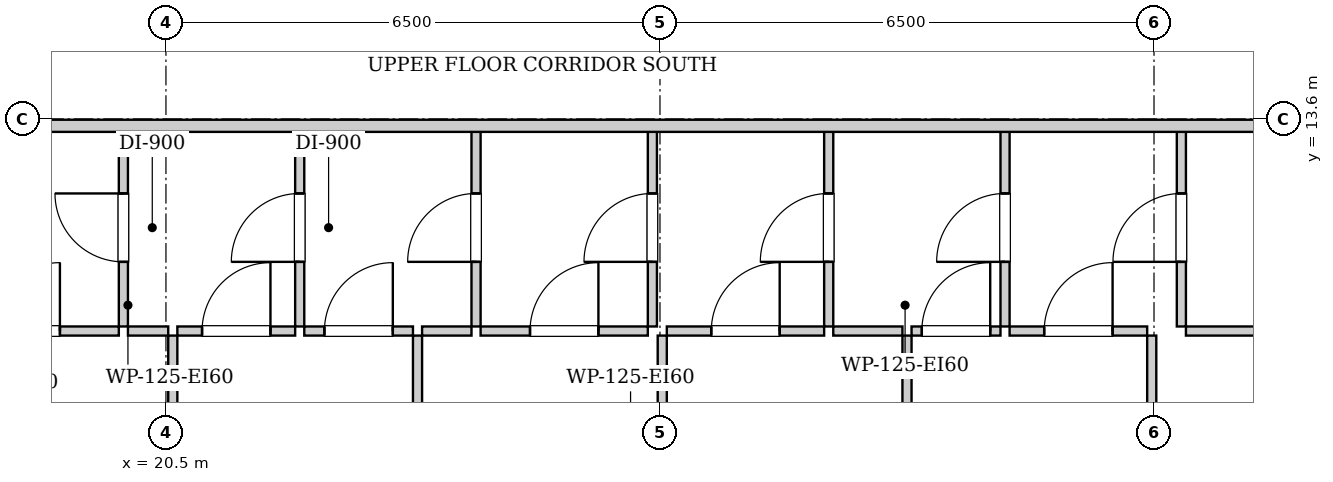
"""IFC4 building model, lengths in metres.
Left out: names, types, materials, properties, quantities, classifications, styles, units other than length and angle.
Written with IfcOpenShell. Run it as: python <this file> out.ifc"""

import sys

from ifc_helpers import new_model, si_unit, direction, frame, frame_2d, origin, place, context, subcontext, project, spatial, rectangle, extrude, element, fill, save


model = new_model("IFC4")
c1 = context("Model", 3, precision=1e-05, world=origin(), true_north=direction((0.0, 1.0)))
c2 = subcontext(c1, "Body", "Model", "MODEL_VIEW")
j1 = project(units=[si_unit("LENGTHUNIT", "METRE"), si_unit("PLANEANGLEUNIT", "RADIAN")], contexts=[c1])
p1 = place(None, origin())
s1 = spatial("IfcSite", under=j1, at=p1, CompositionType="ELEMENT")
p2 = place(p1, origin())
s2 = spatial("IfcBuilding", under=s1, at=p2, CompositionType="ELEMENT")
p3 = place(p2, frame((0.0, 0.0, 227.5)))
s3 = spatial("IfcBuildingStorey", under=s2, at=p3, CompositionType="ELEMENT", Elevation=227.5)
p4 = place(p3, frame((19.94, 10.87, 0.0), z_axis=(0.0, 0.0, 1.0), x_axis=(0.0, 1.0, 0.0)))
e1 = element("IfcWall", 1, at=p4, inside=s3, PredefinedType="PARTITIONING", context=c2, shape_type="SweptSolid", body=[
    extrude(rectangle(XDim=2.6, YDim=0.12, at=frame_2d((1.3, 0.0))), origin(), (0.0, 0.0, 1.0), 3.14),
])
p5 = place(p4, frame((0.85, 0.0, 0.0)))
e2 = element("IfcOpeningElement", 2, at=p5, cuts=e1, PredefinedType="OPENING", context=c2, shape_type="SweptSolid", body=[
    extrude(rectangle(XDim=0.9, YDim=2.05, at=frame_2d((0.45, 1.025))), frame((0.0, 0.07, 0.0), z_axis=(0.0, -1.0, 0.0), x_axis=(1.0, 0.0, 0.0)), (0.0, 0.0, 1.0), 0.14),
])
p6 = place(p3, frame((17.43, 10.81, 0.0), z_axis=(0.0, 0.0, 1.0), x_axis=(1.0, 0.0, 0.0)))
e3 = element("IfcWall", 3, at=p6, inside=s3, PredefinedType="PARTITIONING", context=c2, shape_type="SweptSolid", body=[
    extrude(rectangle(XDim=2.45, YDim=0.12, at=frame_2d((1.225, 0.0))), origin(), (0.0, 0.0, 1.0), 3.14),
])
p7 = place(p6, frame((0.775, 0.0, 0.0)))
e4 = element("IfcOpeningElement", 4, at=p7, cuts=e3, PredefinedType="OPENING", context=c2, shape_type="SweptSolid", body=[
    extrude(rectangle(XDim=0.9, YDim=2.05, at=frame_2d((0.45, 1.025))), frame((0.0, 0.07, 0.0), z_axis=(0.0, -1.0, 0.0), x_axis=(1.0, 0.0, 0.0)), (0.0, 0.0, 1.0), 0.14),
])
p8 = place(p3, frame((22.26, 10.87, 0.0), z_axis=(0.0, 0.0, 1.0), x_axis=(0.0, 1.0, 0.0)))
e5 = element("IfcWall", 5, at=p8, inside=s3, PredefinedType="PARTITIONING", context=c2, shape_type="SweptSolid", body=[
    extrude(rectangle(XDim=2.6, YDim=0.12, at=frame_2d((1.3, 0.0))), origin(), (0.0, 0.0, 1.0), 3.14),
])
p9 = place(p8, frame((0.85, 0.0, 0.0)))
e6 = element("IfcOpeningElement", 6, at=p9, cuts=e5, PredefinedType="OPENING", context=c2, shape_type="SweptSolid", body=[
    extrude(rectangle(XDim=0.9, YDim=2.05, at=frame_2d((0.45, 1.025))), frame((0.0, 0.07, 0.0), z_axis=(0.0, -1.0, 0.0), x_axis=(1.0, 0.0, 0.0)), (0.0, 0.0, 1.0), 0.14),
])
p10 = place(p3, frame((20.0, 10.81, 0.0), z_axis=(0.0, 0.0, 1.0), x_axis=(1.0, 0.0, 0.0)))
e7 = element("IfcWall", 7, at=p10, inside=s3, PredefinedType="PARTITIONING", context=c2, shape_type="SweptSolid", body=[
    extrude(rectangle(XDim=0.53, YDim=0.12, at=frame_2d((0.265, 0.0))), origin(), (0.0, 0.0, 1.0), 3.14),
])
p11 = place(p3, frame((20.65, 10.81, 0.0), z_axis=(0.0, 0.0, 1.0), x_axis=(1.0, 0.0, 0.0)))
e8 = element("IfcWall", 8, at=p11, inside=s3, PredefinedType="PARTITIONING", context=c2, shape_type="SweptSolid", body=[
    extrude(rectangle(XDim=1.55, YDim=0.12, at=frame_2d((0.775, 0.0))), origin(), (0.0, 0.0, 1.0), 3.14),
])
p12 = place(p11, frame((0.325, 0.0, 0.0)))
e9 = element("IfcOpeningElement", 9, at=p12, cuts=e8, PredefinedType="OPENING", context=c2, shape_type="SweptSolid", body=[
    extrude(rectangle(XDim=0.9, YDim=2.05, at=frame_2d((0.45, 1.025))), frame((0.0, 0.07, 0.0), z_axis=(0.0, -1.0, 0.0), x_axis=(1.0, 0.0, 0.0)), (0.0, 0.0, 1.0), 0.14),
])
p13 = place(p3, frame((24.58, 10.87, 0.0), z_axis=(0.0, 0.0, 1.0), x_axis=(0.0, 1.0, 0.0)))
e10 = element("IfcWall", 10, at=p13, inside=s3, PredefinedType="PARTITIONING", context=c2, shape_type="SweptSolid", body=[
    extrude(rectangle(XDim=2.6, YDim=0.12, at=frame_2d((1.3, 0.0))), origin(), (0.0, 0.0, 1.0), 3.14),
])
p14 = place(p13, frame((0.85, 0.0, 0.0)))
e11 = element("IfcOpeningElement", 11, at=p14, cuts=e10, PredefinedType="OPENING", context=c2, shape_type="SweptSolid", body=[
    extrude(rectangle(XDim=0.9, YDim=2.05, at=frame_2d((0.45, 1.025))), frame((0.0, 0.07, 0.0), z_axis=(0.0, -1.0, 0.0), x_axis=(1.0, 0.0, 0.0)), (0.0, 0.0, 1.0), 0.14),
])
p15 = place(p3, frame((22.32, 10.81, 0.0), z_axis=(0.0, 0.0, 1.0), x_axis=(1.0, 0.0, 0.0)))
e12 = element("IfcWall", 12, at=p15, inside=s3, PredefinedType="PARTITIONING", context=c2, shape_type="SweptSolid", body=[
    extrude(rectangle(XDim=1.43, YDim=0.12, at=frame_2d((0.715, 0.0))), origin(), (0.0, 0.0, 1.0), 3.14),
])
p16 = place(p15, frame((0.265, 0.0, 0.0)))
e13 = element("IfcOpeningElement", 13, at=p16, cuts=e12, PredefinedType="OPENING", context=c2, shape_type="SweptSolid", body=[
    extrude(rectangle(XDim=0.9, YDim=2.05, at=frame_2d((0.45, 1.025))), frame((0.0, 0.07, 0.0), z_axis=(0.0, -1.0, 0.0), x_axis=(1.0, 0.0, 0.0)), (0.0, 0.0, 1.0), 0.14),
])
p17 = place(p3, frame((23.87, 10.81, 0.0), z_axis=(0.0, 0.0, 1.0), x_axis=(1.0, 0.0, 0.0)))
e14 = element("IfcWall", 14, at=p17, inside=s3, PredefinedType="PARTITIONING", context=c2, shape_type="SweptSolid", body=[
    extrude(rectangle(XDim=0.65, YDim=0.12, at=frame_2d((0.325, 0.0))), origin(), (0.0, 0.0, 1.0), 3.14),
])
p18 = place(p3, frame((26.9, 10.87, 0.0), z_axis=(0.0, 0.0, 1.0), x_axis=(0.0, 1.0, 0.0)))
e15 = element("IfcWall", 15, at=p18, inside=s3, PredefinedType="PARTITIONING", context=c2, shape_type="SweptSolid", body=[
    extrude(rectangle(XDim=2.6, YDim=0.12, at=frame_2d((1.3, 0.0))), origin(), (0.0, 0.0, 1.0), 3.14),
])
p19 = place(p18, frame((0.85, 0.0, 0.0)))
e16 = element("IfcOpeningElement", 16, at=p19, cuts=e15, PredefinedType="OPENING", context=c2, shape_type="SweptSolid", body=[
    extrude(rectangle(XDim=0.9, YDim=2.05, at=frame_2d((0.45, 1.025))), frame((0.0, 0.07, 0.0), z_axis=(0.0, -1.0, 0.0), x_axis=(1.0, 0.0, 0.0)), (0.0, 0.0, 1.0), 0.14),
])
p20 = place(p3, frame((24.64, 10.81, 0.0), z_axis=(0.0, 0.0, 1.0), x_axis=(1.0, 0.0, 0.0)))
e17 = element("IfcWall", 17, at=p20, inside=s3, PredefinedType="PARTITIONING", context=c2, shape_type="SweptSolid", body=[
    extrude(rectangle(XDim=2.2, YDim=0.12, at=frame_2d((1.1, 0.0))), origin(), (0.0, 0.0, 1.0), 3.14),
])
p21 = place(p20, frame((0.65, 0.0, 0.0)))
e18 = element("IfcOpeningElement", 18, at=p21, cuts=e17, PredefinedType="OPENING", context=c2, shape_type="SweptSolid", body=[
    extrude(rectangle(XDim=0.9, YDim=2.05, at=frame_2d((0.45, 1.025))), frame((0.0, 0.07, 0.0), z_axis=(0.0, -1.0, 0.0), x_axis=(1.0, 0.0, 0.0)), (0.0, 0.0, 1.0), 0.14),
])
p22 = place(p3, frame((29.22, 10.87, 0.0), z_axis=(0.0, 0.0, 1.0), x_axis=(0.0, 1.0, 0.0)))
e19 = element("IfcWall", 19, at=p22, inside=s3, PredefinedType="PARTITIONING", context=c2, shape_type="SweptSolid", body=[
    extrude(rectangle(XDim=2.6, YDim=0.12, at=frame_2d((1.3, 0.0))), origin(), (0.0, 0.0, 1.0), 3.14),
])
p23 = place(p22, frame((0.85, 0.0, 0.0)))
e20 = element("IfcOpeningElement", 20, at=p23, cuts=e19, PredefinedType="OPENING", context=c2, shape_type="SweptSolid", body=[
    extrude(rectangle(XDim=0.9, YDim=2.05, at=frame_2d((0.45, 1.025))), frame((0.0, 0.07, 0.0), z_axis=(0.0, -1.0, 0.0), x_axis=(1.0, 0.0, 0.0)), (0.0, 0.0, 1.0), 0.14),
])
p24 = place(p3, frame((27.09, 10.81, 0.0), z_axis=(0.0, 0.0, 1.0), x_axis=(1.0, 0.0, 0.0)))
e21 = element("IfcWall", 21, at=p24, inside=s3, PredefinedType="PARTITIONING", context=c2, shape_type="SweptSolid", body=[
    extrude(rectangle(XDim=2.07, YDim=0.12, at=frame_2d((1.035, 0.0))), origin(), (0.0, 0.0, 1.0), 3.14),
])
p25 = place(p24, frame((0.585, 0.0, 0.0)))
e22 = element("IfcOpeningElement", 22, at=p25, cuts=e21, PredefinedType="OPENING", context=c2, shape_type="SweptSolid", body=[
    extrude(rectangle(XDim=0.9, YDim=2.05, at=frame_2d((0.45, 1.025))), frame((0.0, 0.07, 0.0), z_axis=(0.0, -1.0, 0.0), x_axis=(1.0, 0.0, 0.0)), (0.0, 0.0, 1.0), 0.14),
])
p26 = place(p3, frame((31.54, 10.87, 0.0), z_axis=(0.0, 0.0, 1.0), x_axis=(0.0, 1.0, 0.0)))
e23 = element("IfcWall", 23, at=p26, inside=s3, PredefinedType="PARTITIONING", context=c2, shape_type="SweptSolid", body=[
    extrude(rectangle(XDim=2.6, YDim=0.12, at=frame_2d((1.3, 0.0))), origin(), (0.0, 0.0, 1.0), 3.14),
])
p27 = place(p26, frame((0.85, 0.0, 0.0)))
e24 = element("IfcOpeningElement", 24, at=p27, cuts=e23, PredefinedType="OPENING", context=c2, shape_type="SweptSolid", body=[
    extrude(rectangle(XDim=0.9, YDim=2.05, at=frame_2d((0.45, 1.025))), frame((0.0, 0.07, 0.0), z_axis=(0.0, -1.0, 0.0), x_axis=(1.0, 0.0, 0.0)), (0.0, 0.0, 1.0), 0.14),
])
p28 = place(p3, frame((29.28, 10.81, 0.0), z_axis=(0.0, 0.0, 1.0), x_axis=(1.0, 0.0, 0.0)))
e25 = element("IfcWall", 25, at=p28, inside=s3, PredefinedType="PARTITIONING", context=c2, shape_type="SweptSolid", body=[
    extrude(rectangle(XDim=0.91, YDim=0.12, at=frame_2d((0.455, 0.0))), origin(), (0.0, 0.0, 1.0), 3.14),
])
p29 = place(p3, frame((30.31, 10.81, 0.0), z_axis=(0.0, 0.0, 1.0), x_axis=(1.0, 0.0, 0.0)))
e26 = element("IfcWall", 26, at=p29, inside=s3, PredefinedType="PARTITIONING", context=c2, shape_type="SweptSolid", body=[
    extrude(rectangle(XDim=1.17, YDim=0.12, at=frame_2d((0.585, 0.0))), origin(), (0.0, 0.0, 1.0), 3.14),
])
p30 = place(p29, frame((0.135, 0.0, 0.0)))
e27 = element("IfcOpeningElement", 27, at=p30, cuts=e26, PredefinedType="OPENING", context=c2, shape_type="SweptSolid", body=[
    extrude(rectangle(XDim=0.9, YDim=2.05, at=frame_2d((0.45, 1.025))), frame((0.0, 0.07, 0.0), z_axis=(0.0, -1.0, 0.0), x_axis=(1.0, 0.0, 0.0)), (0.0, 0.0, 1.0), 0.14),
])
p31 = place(p3, frame((33.86, 10.87, 0.0), z_axis=(0.0, 0.0, 1.0), x_axis=(0.0, 1.0, 0.0)))
e28 = element("IfcWall", 28, at=p31, inside=s3, PredefinedType="PARTITIONING", context=c2, shape_type="SweptSolid", body=[
    extrude(rectangle(XDim=2.6, YDim=0.12, at=frame_2d((1.3, 0.0))), origin(), (0.0, 0.0, 1.0), 3.14),
])
p32 = place(p31, frame((0.85, 0.0, 0.0)))
e29 = element("IfcOpeningElement", 29, at=p32, cuts=e28, PredefinedType="OPENING", context=c2, shape_type="SweptSolid", body=[
    extrude(rectangle(XDim=0.9, YDim=2.05, at=frame_2d((0.45, 1.025))), frame((0.0, 0.07, 0.0), z_axis=(0.0, -1.0, 0.0), x_axis=(1.0, 0.0, 0.0)), (0.0, 0.0, 1.0), 0.14),
])
p33 = place(p3, frame((31.6, 10.81, 0.0), z_axis=(0.0, 0.0, 1.0), x_axis=(1.0, 0.0, 0.0)))
e30 = element("IfcWall", 30, at=p33, inside=s3, PredefinedType="PARTITIONING", context=c2, shape_type="SweptSolid", body=[
    extrude(rectangle(XDim=1.81, YDim=0.12, at=frame_2d((0.905, 0.0))), origin(), (0.0, 0.0, 1.0), 3.14),
])
p34 = place(p33, frame((0.455, 0.0, 0.0)))
e31 = element("IfcOpeningElement", 31, at=p34, cuts=e30, PredefinedType="OPENING", context=c2, shape_type="SweptSolid", body=[
    extrude(rectangle(XDim=0.9, YDim=2.05, at=frame_2d((0.45, 1.025))), frame((0.0, 0.07, 0.0), z_axis=(0.0, -1.0, 0.0), x_axis=(1.0, 0.0, 0.0)), (0.0, 0.0, 1.0), 0.14),
])
p35 = place(p3, frame((33.92, 10.81, 0.0), z_axis=(0.0, 0.0, 1.0), x_axis=(1.0, 0.0, 0.0)))
e32 = element("IfcWall", 32, at=p35, inside=s3, PredefinedType="PARTITIONING", context=c2, shape_type="SweptSolid", body=[
    extrude(rectangle(XDim=3.8, YDim=0.12, at=frame_2d((1.9, 0.0))), origin(), (0.0, 0.0, 1.0), 3.14),
])
p36 = place(p35, frame((1.45, 0.0, 0.0)))
e33 = element("IfcOpeningElement", 33, at=p36, cuts=e32, PredefinedType="OPENING", context=c2, shape_type="SweptSolid", body=[
    extrude(rectangle(XDim=0.9, YDim=2.05, at=frame_2d((0.45, 1.025))), frame((0.0, 0.07, 0.0), z_axis=(0.0, -1.0, 0.0), x_axis=(1.0, 0.0, 0.0)), (0.0, 0.0, 1.0), 0.14),
])
p37 = place(p3, frame((20.59, 4.08, 0.0), z_axis=(0.0, 0.0, 1.0), x_axis=(0.0, 1.0, 0.0)))
e34 = element("IfcWall", 34, at=p37, inside=s3, PredefinedType="PARTITIONING", context=c2, shape_type="SweptSolid", body=[
    extrude(rectangle(XDim=6.67, YDim=0.12, at=frame_2d((3.335, 0.0))), origin(), (0.0, 0.0, 1.0), 3.14),
])
p38 = place(p37, frame((2.87, 0.0, 0.0)))
e35 = element("IfcOpeningElement", 35, at=p38, cuts=e34, PredefinedType="OPENING", context=c2, shape_type="SweptSolid", body=[
    extrude(rectangle(XDim=0.9, YDim=2.05, at=frame_2d((0.45, 1.025))), frame((0.0, 0.07, 0.0), z_axis=(0.0, -1.0, 0.0), x_axis=(1.0, 0.0, 0.0)), (0.0, 0.0, 1.0), 0.14),
])
p39 = place(p3, frame((23.81, 4.08, 0.0), z_axis=(0.0, 0.0, 1.0), x_axis=(0.0, 1.0, 0.0)))
e36 = element("IfcWall", 36, at=p39, inside=s3, PredefinedType="PARTITIONING", context=c2, shape_type="SweptSolid", body=[
    extrude(rectangle(XDim=6.67, YDim=0.12, at=frame_2d((3.335, 0.0))), origin(), (0.0, 0.0, 1.0), 3.14),
])
p40 = place(p39, frame((2.87, 0.0, 0.0)))
e37 = element("IfcOpeningElement", 37, at=p40, cuts=e36, PredefinedType="OPENING", context=c2, shape_type="SweptSolid", body=[
    extrude(rectangle(XDim=0.9, YDim=2.05, at=frame_2d((0.45, 1.025))), frame((0.0, 0.07, 0.0), z_axis=(0.0, -1.0, 0.0), x_axis=(1.0, 0.0, 0.0)), (0.0, 0.0, 1.0), 0.14),
])
p41 = place(p3, frame((27.03, 4.08, 0.0), z_axis=(0.0, 0.0, 1.0), x_axis=(0.0, 1.0, 0.0)))
e38 = element("IfcWall", 38, at=p41, inside=s3, PredefinedType="PARTITIONING", context=c2, shape_type="SweptSolid", body=[
    extrude(rectangle(XDim=6.67, YDim=0.12, at=frame_2d((3.335, 0.0))), origin(), (0.0, 0.0, 1.0), 3.14),
])
p42 = place(p41, frame((2.87, 0.0, 0.0)))
e39 = element("IfcOpeningElement", 39, at=p42, cuts=e38, PredefinedType="OPENING", context=c2, shape_type="SweptSolid", body=[
    extrude(rectangle(XDim=0.9, YDim=2.05, at=frame_2d((0.45, 1.025))), frame((0.0, 0.07, 0.0), z_axis=(0.0, -1.0, 0.0), x_axis=(1.0, 0.0, 0.0)), (0.0, 0.0, 1.0), 0.14),
])
p43 = place(p3, frame((30.25, 4.08, 0.0), z_axis=(0.0, 0.0, 1.0), x_axis=(0.0, 1.0, 0.0)))
e40 = element("IfcWall", 40, at=p43, inside=s3, PredefinedType="PARTITIONING", context=c2, shape_type="SweptSolid", body=[
    extrude(rectangle(XDim=6.67, YDim=0.12, at=frame_2d((3.335, 0.0))), origin(), (0.0, 0.0, 1.0), 3.14),
])
p44 = place(p43, frame((2.87, 0.0, 0.0)))
e41 = element("IfcOpeningElement", 41, at=p44, cuts=e40, PredefinedType="OPENING", context=c2, shape_type="SweptSolid", body=[
    extrude(rectangle(XDim=0.9, YDim=2.05, at=frame_2d((0.45, 1.025))), frame((0.0, 0.07, 0.0), z_axis=(0.0, -1.0, 0.0), x_axis=(1.0, 0.0, 0.0)), (0.0, 0.0, 1.0), 0.14),
])
p45 = place(p3, frame((33.47, 6.23, 0.0), z_axis=(0.0, 0.0, 1.0), x_axis=(0.0, 1.0, 0.0)))
e42 = element("IfcWall", 42, at=p45, inside=s3, PredefinedType="PARTITIONING", context=c2, shape_type="SweptSolid", body=[
    extrude(rectangle(XDim=4.52, YDim=0.12, at=frame_2d((2.26, 0.0))), origin(), (0.0, 0.0, 1.0), 3.14),
])
p46 = place(p45, frame((1.81, 0.0, 0.0)))
e43 = element("IfcOpeningElement", 43, at=p46, cuts=e42, PredefinedType="OPENING", context=c2, shape_type="SweptSolid", body=[
    extrude(rectangle(XDim=0.9, YDim=2.05, at=frame_2d((0.45, 1.025))), frame((0.0, 0.07, 0.0), z_axis=(0.0, -1.0, 0.0), x_axis=(1.0, 0.0, 0.0)), (0.0, 0.0, 1.0), 0.14),
])
p47 = place(p3, frame((13.15, 13.51, 0.0), z_axis=(0.0, 0.0, 1.0), x_axis=(1.0, 0.0, 0.0)))
e44 = element("IfcWall", 44, at=p47, inside=s3, PredefinedType="PARTITIONING", context=c2, shape_type="SweptSolid", body=[
    extrude(rectangle(XDim=24.6, YDim=0.16, at=frame_2d((12.3, 0.0))), origin(), (0.0, 0.0, 1.0), 3.14),
])
p48 = place(p47, frame((3.165, 0.0, 0.0)))
e45 = element("IfcOpeningElement", 45, at=p48, cuts=e44, PredefinedType="OPENING", context=c2, shape_type="SweptSolid", body=[
    extrude(rectangle(XDim=0.95, YDim=2.1, at=frame_2d((0.475, 1.05))), frame((0.0, 0.09, 0.0), z_axis=(0.0, -1.0, 0.0), x_axis=(1.0, 0.0, 0.0)), (0.0, 0.0, 1.0), 0.18),
])
p49 = place(p5, origin())
e46 = element("IfcDoor", 46, at=p49, inside=s3, OperationType="SINGLE_SWING_RIGHT", PredefinedType="DOOR", context=c2, shape_type="SweptSolid", body=[
    extrude(rectangle(XDim=0.9, YDim=2.05, at=frame_2d((0.45, 1.025))), frame((0.0, 0.025, 0.0), z_axis=(0.0, -1.0, 0.0), x_axis=(1.0, 0.0, 0.0)), (0.0, 0.0, 1.0), 0.05),
])
fill(e2, e46)
p50 = place(p7, origin())
e47 = element("IfcDoor", 47, at=p50, inside=s3, OperationType="SINGLE_SWING_RIGHT", PredefinedType="DOOR", context=c2, shape_type="SweptSolid", body=[
    extrude(rectangle(XDim=0.9, YDim=2.05, at=frame_2d((0.45, 1.025))), frame((0.0, 0.025, 0.0), z_axis=(0.0, -1.0, 0.0), x_axis=(1.0, 0.0, 0.0)), (0.0, 0.0, 1.0), 0.05),
])
fill(e4, e47)
p51 = place(p9, origin())
e48 = element("IfcDoor", 48, at=p51, inside=s3, OperationType="SINGLE_SWING_LEFT", PredefinedType="DOOR", context=c2, shape_type="SweptSolid", body=[
    extrude(rectangle(XDim=0.9, YDim=2.05, at=frame_2d((0.45, 1.025))), frame((0.0, 0.025, 0.0), z_axis=(0.0, -1.0, 0.0), x_axis=(1.0, 0.0, 0.0)), (0.0, 0.0, 1.0), 0.05),
])
fill(e6, e48)
p52 = place(p12, origin())
e49 = element("IfcDoor", 49, at=p52, inside=s3, OperationType="SINGLE_SWING_RIGHT", PredefinedType="DOOR", context=c2, shape_type="SweptSolid", body=[
    extrude(rectangle(XDim=0.9, YDim=2.05, at=frame_2d((0.45, 1.025))), frame((0.0, 0.025, 0.0), z_axis=(0.0, -1.0, 0.0), x_axis=(1.0, 0.0, 0.0)), (0.0, 0.0, 1.0), 0.05),
])
fill(e9, e49)
p53 = place(p14, origin())
e50 = element("IfcDoor", 50, at=p53, inside=s3, OperationType="SINGLE_SWING_LEFT", PredefinedType="DOOR", context=c2, shape_type="SweptSolid", body=[
    extrude(rectangle(XDim=0.9, YDim=2.05, at=frame_2d((0.45, 1.025))), frame((0.0, 0.025, 0.0), z_axis=(0.0, -1.0, 0.0), x_axis=(1.0, 0.0, 0.0)), (0.0, 0.0, 1.0), 0.05),
])
fill(e11, e50)
p54 = place(p16, origin())
e51 = element("IfcDoor", 51, at=p54, inside=s3, OperationType="SINGLE_SWING_RIGHT", PredefinedType="DOOR", context=c2, shape_type="SweptSolid", body=[
    extrude(rectangle(XDim=0.9, YDim=2.05, at=frame_2d((0.45, 1.025))), frame((0.0, 0.025, 0.0), z_axis=(0.0, -1.0, 0.0), x_axis=(1.0, 0.0, 0.0)), (0.0, 0.0, 1.0), 0.05),
])
fill(e13, e51)
p55 = place(p19, origin())
e52 = element("IfcDoor", 52, at=p55, inside=s3, OperationType="SINGLE_SWING_LEFT", PredefinedType="DOOR", context=c2, shape_type="SweptSolid", body=[
    extrude(rectangle(XDim=0.9, YDim=2.05, at=frame_2d((0.45, 1.025))), frame((0.0, 0.025, 0.0), z_axis=(0.0, -1.0, 0.0), x_axis=(1.0, 0.0, 0.0)), (0.0, 0.0, 1.0), 0.05),
])
fill(e16, e52)
p56 = place(p21, origin())
e53 = element("IfcDoor", 53, at=p56, inside=s3, OperationType="SINGLE_SWING_RIGHT", PredefinedType="DOOR", context=c2, shape_type="SweptSolid", body=[
    extrude(rectangle(XDim=0.9, YDim=2.05, at=frame_2d((0.45, 1.025))), frame((0.0, 0.025, 0.0), z_axis=(0.0, -1.0, 0.0), x_axis=(1.0, 0.0, 0.0)), (0.0, 0.0, 1.0), 0.05),
])
fill(e18, e53)
p57 = place(p23, origin())
e54 = element("IfcDoor", 54, at=p57, inside=s3, OperationType="SINGLE_SWING_LEFT", PredefinedType="DOOR", context=c2, shape_type="SweptSolid", body=[
    extrude(rectangle(XDim=0.9, YDim=2.05, at=frame_2d((0.45, 1.025))), frame((0.0, 0.025, 0.0), z_axis=(0.0, -1.0, 0.0), x_axis=(1.0, 0.0, 0.0)), (0.0, 0.0, 1.0), 0.05),
])
fill(e20, e54)
p58 = place(p25, origin())
e55 = element("IfcDoor", 55, at=p58, inside=s3, OperationType="SINGLE_SWING_RIGHT", PredefinedType="DOOR", context=c2, shape_type="SweptSolid", body=[
    extrude(rectangle(XDim=0.9, YDim=2.05, at=frame_2d((0.45, 1.025))), frame((0.0, 0.025, 0.0), z_axis=(0.0, -1.0, 0.0), x_axis=(1.0, 0.0, 0.0)), (0.0, 0.0, 1.0), 0.05),
])
fill(e22, e55)
p59 = place(p27, origin())
e56 = element("IfcDoor", 56, at=p59, inside=s3, OperationType="SINGLE_SWING_LEFT", PredefinedType="DOOR", context=c2, shape_type="SweptSolid", body=[
    extrude(rectangle(XDim=0.9, YDim=2.05, at=frame_2d((0.45, 1.025))), frame((0.0, 0.025, 0.0), z_axis=(0.0, -1.0, 0.0), x_axis=(1.0, 0.0, 0.0)), (0.0, 0.0, 1.0), 0.05),
])
fill(e24, e56)
p60 = place(p30, origin())
e57 = element("IfcDoor", 57, at=p60, inside=s3, OperationType="SINGLE_SWING_RIGHT", PredefinedType="DOOR", context=c2, shape_type="SweptSolid", body=[
    extrude(rectangle(XDim=0.9, YDim=2.05, at=frame_2d((0.45, 1.025))), frame((0.0, 0.025, 0.0), z_axis=(0.0, -1.0, 0.0), x_axis=(1.0, 0.0, 0.0)), (0.0, 0.0, 1.0), 0.05),
])
fill(e27, e57)
p61 = place(p32, origin())
e58 = element("IfcDoor", 58, at=p61, inside=s3, OperationType="SINGLE_SWING_LEFT", PredefinedType="DOOR", context=c2, shape_type="SweptSolid", body=[
    extrude(rectangle(XDim=0.9, YDim=2.05, at=frame_2d((0.45, 1.025))), frame((0.0, 0.025, 0.0), z_axis=(0.0, -1.0, 0.0), x_axis=(1.0, 0.0, 0.0)), (0.0, 0.0, 1.0), 0.05),
])
fill(e29, e58)
p62 = place(p34, origin())
e59 = element("IfcDoor", 59, at=p62, inside=s3, OperationType="SINGLE_SWING_RIGHT", PredefinedType="DOOR", context=c2, shape_type="SweptSolid", body=[
    extrude(rectangle(XDim=0.9, YDim=2.05, at=frame_2d((0.45, 1.025))), frame((0.0, 0.025, 0.0), z_axis=(0.0, -1.0, 0.0), x_axis=(1.0, 0.0, 0.0)), (0.0, 0.0, 1.0), 0.05),
])
fill(e31, e59)
save(model, sys.argv[1])
